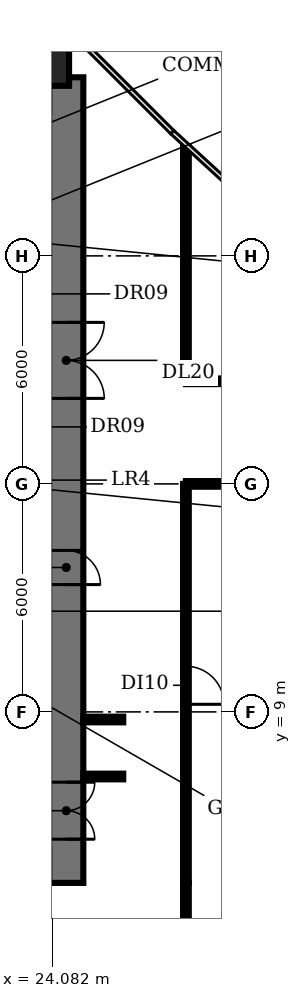
"""IFC4 building model, lengths in metres.
Left out: names, types, materials, properties, quantities, classifications, styles, units other than length and angle.
Written with IfcOpenShell. Run it as: python <this file> out.ifc"""

import sys

from ifc_helpers import new_model, si_unit, direction, frame, frame_2d, origin, origin_2d, place, context, subcontext, project, spatial, rectangle, circle, extrude, element, fill, save


model = new_model("IFC4")
c1 = context("Model", 3, precision=1e-05, world=origin(), true_north=direction((0.0, 1.0)))
c2 = subcontext(c1, "Body", "Model", "MODEL_VIEW")
j1 = project(units=[si_unit("LENGTHUNIT", "METRE"), si_unit("PLANEANGLEUNIT", "RADIAN")], contexts=[c1])
p1 = place(None, origin())
s1 = spatial("IfcSite", under=j1, at=p1, CompositionType="ELEMENT")
p2 = place(p1, origin())
s2 = spatial("IfcBuilding", under=s1, at=p2, CompositionType="ELEMENT")
p3 = place(p2, frame((0.0, 0.0, 62.6)))
s3 = spatial("IfcBuildingStorey", under=s2, at=p3, CompositionType="ELEMENT", Elevation=62.6)
p4 = place(p3, frame((24.0, 26.0, 0.0), z_axis=(0.0, 0.0, 1.0), x_axis=(1.0, 0.0, 0.0)))
e1 = element("IfcColumn", 1, at=p4, inside=s3, PredefinedType="COLUMN", context=c2, shape_type="SweptSolid", body=[
    extrude(circle(Radius=0.525, at=origin_2d()), origin(), (0.0, 0.0, 1.0), 3.85),
])
p5 = place(p3, frame((24.45, 25.7, 0.0), z_axis=(0.0, 0.0, 1.0), x_axis=(0.0, -1.0, 0.0)))
e2 = element("IfcWall", 2, at=p5, inside=s3, PredefinedType="SHEAR", context=c2, shape_type="SweptSolid", body=[
    extrude(rectangle(XDim=21.2, YDim=0.9, at=frame_2d((10.6, 0.0))), origin(), (0.0, 0.0, 1.0), 3.85),
])
p6 = place(p5, frame((18.55, 0.0, 0.0)))
e3 = element("IfcOpeningElement", 3, at=p6, cuts=e2, PredefinedType="OPENING", context=c2, shape_type="SweptSolid", body=[
    extrude(rectangle(XDim=1.5, YDim=2.1, at=frame_2d((0.75, 1.05))), frame((0.0, 0.46, 0.0), z_axis=(0.0, -1.0, 0.0), x_axis=(1.0, 0.0, 0.0)), (0.0, 0.0, 1.0), 0.92),
])
p7 = place(p5, frame((12.45, 0.0, 0.0)))
e4 = element("IfcOpeningElement", 4, at=p7, cuts=e2, PredefinedType="OPENING", context=c2, shape_type="SweptSolid", body=[
    extrude(rectangle(XDim=0.9, YDim=2.1, at=frame_2d((0.45, 1.05))), frame((0.0, 0.46, 0.0), z_axis=(0.0, -1.0, 0.0), x_axis=(1.0, 0.0, 0.0)), (0.0, 0.0, 1.0), 0.92),
])
p8 = place(p5, frame((6.45, 0.0, 0.0)))
e5 = element("IfcOpeningElement", 5, at=p8, cuts=e2, PredefinedType="OPENING", context=c2, shape_type="SweptSolid", body=[
    extrude(rectangle(XDim=2.0, YDim=2.1, at=frame_2d((1.0, 1.05))), frame((0.0, 0.46, 0.0), z_axis=(0.0, -1.0, 0.0), x_axis=(1.0, 0.0, 0.0)), (0.0, 0.0, 1.0), 0.92),
])
for number, where, z_axis, x_axis in (
    (6, (24.9, 7.3, 0.0), (0.0, 0.0, 1.0), (1.0, 0.0, 0.0)),
    (7, (24.9, 8.8, 0.0), (0.0, 0.0, 1.0), (1.0, 0.0, 0.0)),
):
    element("IfcWall", number, at=place(p3, frame(where, z_axis=z_axis, x_axis=x_axis)), inside=s3, PredefinedType="PARTITIONING", context=c2, shape_type="SweptSolid", body=[
        extrude(rectangle(XDim=1.05, YDim=0.15, at=frame_2d((0.525, 0.0))), origin(), (0.0, 0.0, 1.0), 2.83),
    ])
p9 = place(p3, frame((27.6, 0.6, 0.0), z_axis=(0.0, 0.0, 1.0), x_axis=(0.0, 1.0, 0.0)))
e8 = element("IfcWall", 8, at=p9, inside=s3, PredefinedType="PARTITIONING", context=c2, shape_type="SweptSolid", body=[
    extrude(rectangle(XDim=3.9, YDim=0.15, at=frame_2d((1.95, 0.0))), origin(), (0.0, 0.0, 1.0), 2.83),
])
p10 = place(p3, frame((27.6, 15.0, 0.0), z_axis=(0.0, 0.0, 1.0), x_axis=(0.0, -1.0, 0.0)))
e9 = element("IfcWall", 9, at=p10, inside=s3, PredefinedType="PARTITIONING", context=c2, shape_type="SweptSolid", body=[
    extrude(rectangle(XDim=10.5, YDim=0.15, at=frame_2d((5.25, 0.0))), origin(), (0.0, 0.0, 1.0), 2.83),
])
p11 = place(p10, frame((4.8, 0.0, 0.0)))
e10 = element("IfcOpeningElement", 10, at=p11, cuts=e9, PredefinedType="OPENING", context=c2, shape_type="SweptSolid", body=[
    extrude(rectangle(XDim=1.0, YDim=2.1, at=frame_2d((0.5, 1.05))), frame((0.0, 0.085, 0.0), z_axis=(0.0, -1.0, 0.0), x_axis=(1.0, 0.0, 0.0)), (0.0, 0.0, 1.0), 0.17),
])
p12 = place(p3, frame((27.6, 15.0, 0.0), z_axis=(0.0, 0.0, 1.0), x_axis=(1.0, 0.0, 0.0)))
e11 = element("IfcWall", 11, at=p12, inside=s3, PredefinedType="PARTITIONING", context=c2, shape_type="SweptSolid", body=[
    extrude(rectangle(XDim=8.4, YDim=0.15, at=frame_2d((4.2, 0.0))), origin(), (0.0, 0.0, 1.0), 2.83),
])
p13 = place(p3, frame((27.6, 17.7, 0.0), z_axis=(0.0, 0.0, 1.0), x_axis=(0.0, 1.0, 0.0)))
e12 = element("IfcWall", 12, at=p13, inside=s3, PredefinedType="PARTITIONING", context=c2, shape_type="SweptSolid", body=[
    extrude(rectangle(XDim=6.16, YDim=0.15, at=frame_2d((3.08, 0.0))), origin(), (0.0, 0.0, 1.0), 2.83),
])
p14 = place(p3, frame((27.6, 17.7, 0.0), z_axis=(0.0, 0.0, 1.0), x_axis=(1.0, 0.0, 0.0)))
e13 = element("IfcWall", 13, at=p14, inside=s3, PredefinedType="PARTITIONING", context=c2, shape_type="SweptSolid", body=[
    extrude(rectangle(XDim=8.4, YDim=0.15, at=frame_2d((4.2, 0.0))), origin(), (0.0, 0.0, 1.0), 2.83),
])
p15 = place(p14, frame((3.9, 0.0, 0.0)))
e14 = element("IfcOpeningElement", 14, at=p15, cuts=e13, PredefinedType="OPENING", context=c2, shape_type="SweptSolid", body=[
    extrude(rectangle(XDim=1.0, YDim=2.1, at=frame_2d((0.5, 1.05))), frame((0.0, 0.085, 0.0), z_axis=(0.0, -1.0, 0.0), x_axis=(1.0, 0.0, 0.0)), (0.0, 0.0, 1.0), 0.17),
])
p16 = place(p6, origin())
e15 = element("IfcDoor", 15, at=p16, inside=s3, OperationType="DOUBLE_DOOR_SINGLE_SWING", PredefinedType="DOOR", context=c2, shape_type="SweptSolid", body=[
    extrude(rectangle(XDim=1.5, YDim=2.1, at=frame_2d((0.75, 1.05))), frame((0.0, 0.025, 0.0), z_axis=(0.0, -1.0, 0.0), x_axis=(1.0, 0.0, 0.0)), (0.0, 0.0, 1.0), 0.05),
])
fill(e3, e15)
p17 = place(p8, origin())
e16 = element("IfcDoor", 16, at=p17, inside=s3, OperationType="DOUBLE_DOOR_SINGLE_SWING", PredefinedType="DOOR", context=c2, shape_type="SweptSolid", body=[
    extrude(rectangle(XDim=2.0, YDim=2.1, at=frame_2d((1.0, 1.05))), frame((0.0, 0.025, 0.0), z_axis=(0.0, -1.0, 0.0), x_axis=(1.0, 0.0, 0.0)), (0.0, 0.0, 1.0), 0.05),
])
fill(e5, e16)
p18 = place(p11, origin())
e17 = element("IfcDoor", 17, at=p18, inside=s3, OperationType="SINGLE_SWING_RIGHT", PredefinedType="DOOR", context=c2, shape_type="SweptSolid", body=[
    extrude(rectangle(XDim=1.0, YDim=2.1, at=frame_2d((0.5, 1.05))), frame((0.0, 0.025, 0.0), z_axis=(0.0, -1.0, 0.0), x_axis=(1.0, 0.0, 0.0)), (0.0, 0.0, 1.0), 0.05),
])
fill(e10, e17)
save(model, sys.argv[1])
